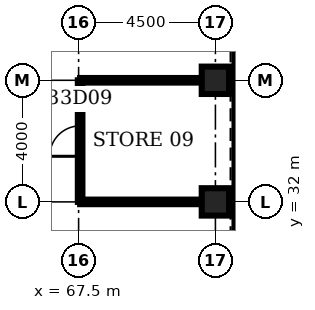
"""IFC4 building model, lengths in metres.
Left out: names, types, materials, properties, quantities, classifications, styles, units other than length and angle.
Written with IfcOpenShell. Run it as: python <this file> out.ifc"""

import sys

from ifc_helpers import new_model, si_unit, direction, frame, frame_2d, origin, origin_2d, place, context, subcontext, project, spatial, rectangle, hollow_rectangle, extrude, element, fill, save


model = new_model("IFC4")
c1 = context("Model", 3, precision=1e-05, world=origin(), true_north=direction((0.0, 1.0)))
c2 = subcontext(c1, "Body", "Model", "MODEL_VIEW")
j1 = project(units=[si_unit("LENGTHUNIT", "METRE"), si_unit("PLANEANGLEUNIT", "RADIAN")], contexts=[c1])
p1 = place(None, origin())
s1 = spatial("IfcSite", under=j1, at=p1, CompositionType="ELEMENT")
p2 = place(p1, origin())
s2 = spatial("IfcBuilding", under=s1, at=p2, CompositionType="ELEMENT")
p3 = place(p2, frame((0.0, 0.0, 150.9)))
s3 = spatial("IfcBuildingStorey", under=s2, at=p3, CompositionType="ELEMENT", Elevation=150.9)
for number, where, z_axis, x_axis in (
    (1, (72.0, 32.0, 0.0), (0.0, 0.0, 1.0), (1.0, 0.0, 0.0)),
    (2, (72.0, 36.0, 0.0), (0.0, 0.0, 1.0), (1.0, 0.0, 0.0)),
):
    element("IfcColumn", number, at=place(p3, frame(where, z_axis=z_axis, x_axis=x_axis)), inside=s3, PredefinedType="COLUMN", context=c2, shape_type="SweptSolid", body=[
        extrude(hollow_rectangle(XDim=0.9, YDim=0.9, WallThickness=0.1, at=origin_2d()), origin(), (0.0, 0.0, 1.0), 4.2),
    ])
for number, where, z_axis, x_axis in (
    (3, (67.55, 32.0, 0.0), (0.0, 0.0, 1.0), (1.0, 0.0, 0.0)),
    (4, (67.55, 36.0, 0.0), (0.0, 0.0, 1.0), (1.0, 0.0, 0.0)),
):
    element("IfcWall", number, at=place(p3, frame(where, z_axis=z_axis, x_axis=x_axis)), inside=s3, PredefinedType="PARTITIONING", context=c2, shape_type="SweptSolid", body=[
        extrude(rectangle(XDim=4.0, YDim=0.15, at=frame_2d((2.0, 0.0))), origin(), (0.0, 0.0, 1.0), 3.0),
    ])
p4 = place(p3, frame((67.55, 32.0, 0.0), z_axis=(0.0, 0.0, 1.0), x_axis=(0.0, 1.0, 0.0)))
e5 = element("IfcWall", 5, at=p4, inside=s3, PredefinedType="PARTITIONING", context=c2, shape_type="SweptSolid", body=[
    extrude(rectangle(XDim=4.0, YDim=0.15, at=frame_2d((2.0, 0.0))), origin(), (0.0, 0.0, 1.0), 3.0),
])
p5 = place(p4, frame((1.5, 0.0, 0.0)))
e6 = element("IfcOpeningElement", 6, at=p5, cuts=e5, PredefinedType="OPENING", context=c2, shape_type="SweptSolid", body=[
    extrude(rectangle(XDim=1.0, YDim=2.1, at=frame_2d((0.5, 1.05))), frame((0.0, 0.085, 0.0), z_axis=(0.0, -1.0, 0.0), x_axis=(1.0, 0.0, 0.0)), (0.0, 0.0, 1.0), 0.17),
])
p6 = place(p5, origin())
e7 = element("IfcDoor", 7, at=p6, inside=s3, OperationType="SINGLE_SWING_LEFT", PredefinedType="DOOR", context=c2, shape_type="SweptSolid", body=[
    extrude(rectangle(XDim=1.0, YDim=2.1, at=frame_2d((0.5, 1.05))), frame((0.0, 0.025, 0.0), z_axis=(0.0, -1.0, 0.0), x_axis=(1.0, 0.0, 0.0)), (0.0, 0.0, 1.0), 0.05),
])
fill(e6, e7)
save(model, sys.argv[1])
